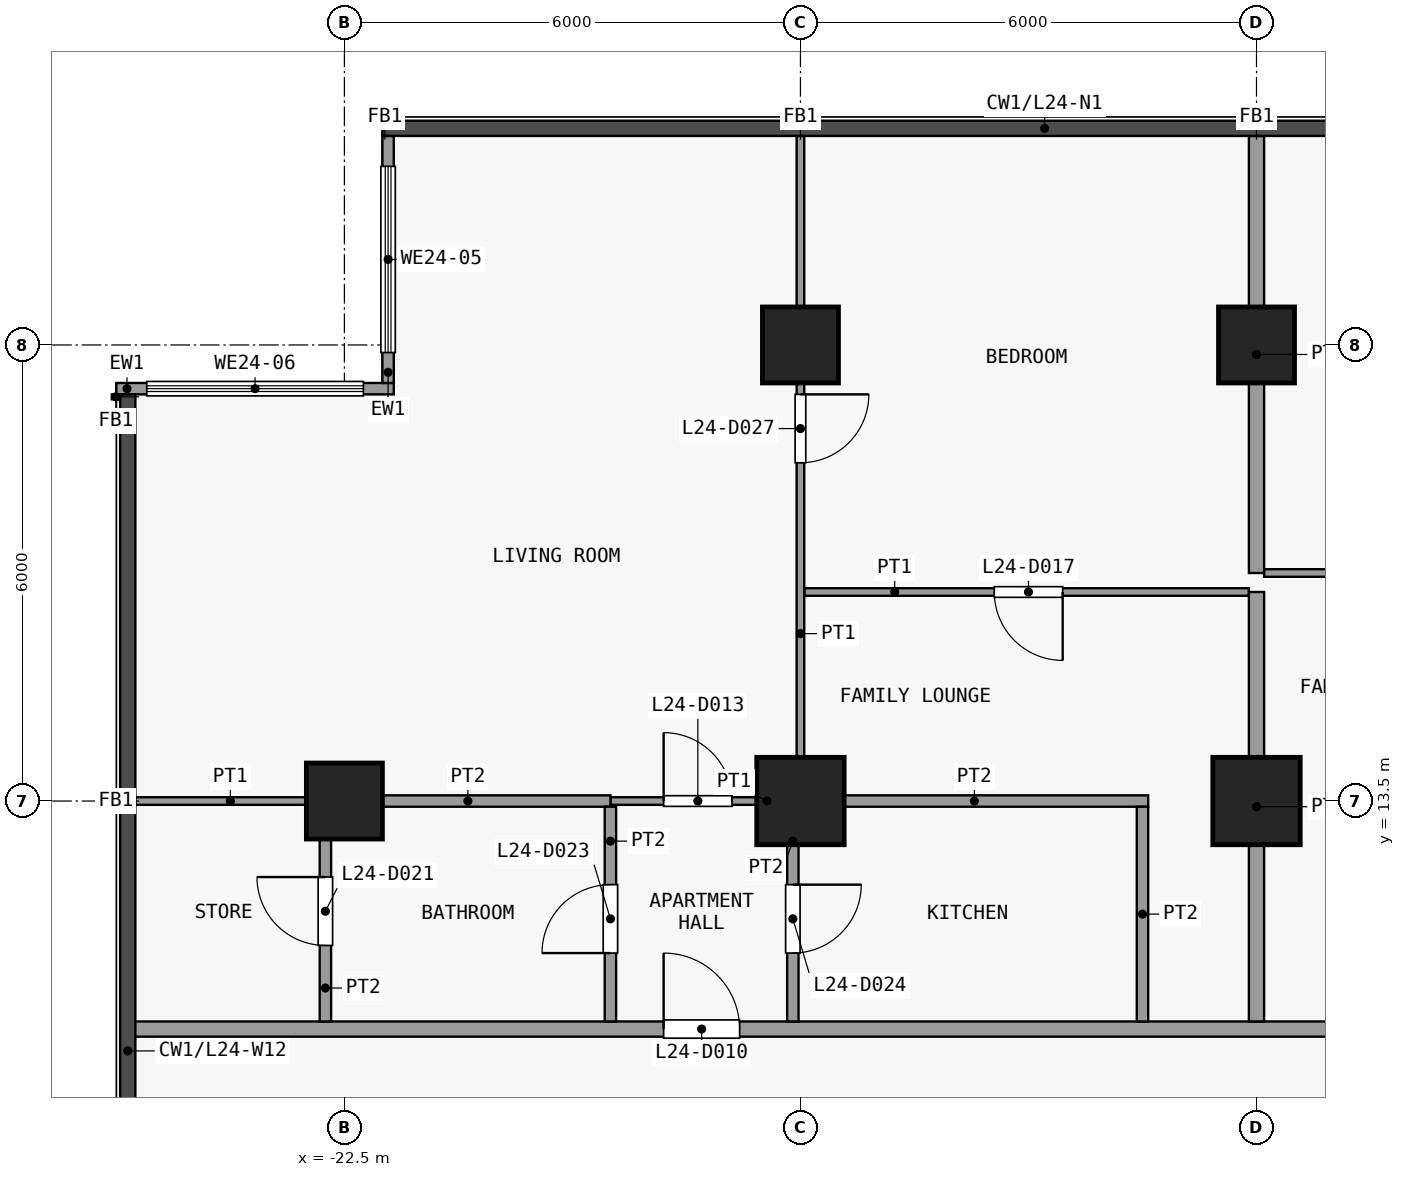
"""IFC4 building model, lengths in metres.
Left out: names, types, materials, properties, quantities, classifications, styles, units other than length and angle.
Written with IfcOpenShell. Run it as: python <this file> out.ifc"""

import sys

from ifc_helpers import new_model, si_unit, direction, frame, frame_2d, origin, origin_2d, place, context, subcontext, project, spatial, rectangle, extrude, element, fill, save


model = new_model("IFC4")
c1 = context("Model", 3, precision=1e-05, world=origin(), true_north=direction((0.0, 1.0)))
c2 = subcontext(c1, "Body", "Model", "MODEL_VIEW")
j1 = project(units=[si_unit("LENGTHUNIT", "METRE"), si_unit("PLANEANGLEUNIT", "RADIAN")], contexts=[c1])
p1 = place(None, origin())
s1 = spatial("IfcSite", under=j1, at=p1, CompositionType="ELEMENT")
p2 = place(p1, origin())
s2 = spatial("IfcBuilding", under=s1, at=p2, CompositionType="ELEMENT")
p3 = place(p2, frame((0.0, 0.0, 99.1)))
s3 = spatial("IfcBuildingStorey", under=s2, at=p3, CompositionType="ELEMENT", Elevation=99.1)
p4 = place(p3, frame((-22.5, 13.5, 0.0), z_axis=(0.0, 0.0, 1.0), x_axis=(1.0, 0.0, 0.0)))
e1 = element("IfcColumn", 1, at=p4, inside=s3, PredefinedType="COLUMN", context=c2, shape_type="SweptSolid", body=[
    extrude(rectangle(XDim=1.0, YDim=1.0, at=origin_2d()), origin(), (0.0, 0.0, 1.0), 3.6),
])
p5 = place(p3, frame((-16.5, 13.5, 0.0), z_axis=(0.0, 0.0, 1.0), x_axis=(1.0, 0.0, 0.0)))
e2 = element("IfcColumn", 2, at=p5, inside=s3, PredefinedType="COLUMN", context=c2, shape_type="SweptSolid", body=[
    extrude(rectangle(XDim=1.15, YDim=1.15, at=origin_2d()), origin(), (0.0, 0.0, 1.0), 3.6),
])
p6 = place(p3, frame((-16.5, 19.5, 0.0), z_axis=(0.0, 0.0, 1.0), x_axis=(1.0, 0.0, 0.0)))
e3 = element("IfcColumn", 3, at=p6, inside=s3, PredefinedType="COLUMN", context=c2, shape_type="SweptSolid", body=[
    extrude(rectangle(XDim=1.0, YDim=1.0, at=origin_2d()), origin(), (0.0, 0.0, 1.0), 3.6),
])
p7 = place(p3, frame((-10.5, 13.5, 0.0), z_axis=(0.0, 0.0, 1.0), x_axis=(1.0, 0.0, 0.0)))
e4 = element("IfcColumn", 4, at=p7, inside=s3, PredefinedType="COLUMN", context=c2, shape_type="SweptSolid", body=[
    extrude(rectangle(XDim=1.15, YDim=1.15, at=origin_2d()), origin(), (0.0, 0.0, 1.0), 3.6),
])
p8 = place(p3, frame((-10.5, 19.5, 0.0), z_axis=(0.0, 0.0, 1.0), x_axis=(1.0, 0.0, 0.0)))
e5 = element("IfcColumn", 5, at=p8, inside=s3, PredefinedType="COLUMN", context=c2, shape_type="SweptSolid", body=[
    extrude(rectangle(XDim=1.0, YDim=1.0, at=origin_2d()), origin(), (0.0, 0.0, 1.0), 3.6),
])
p9 = place(p3, frame((-21.925, 19.0, 0.0), z_axis=(0.0, 0.0, 1.0), x_axis=(0.0, 1.0, 0.0)))
e6 = element("IfcWall", 6, at=p9, inside=s3, PredefinedType="SOLIDWALL", context=c2, shape_type="SweptSolid", body=[
    extrude(rectangle(XDim=3.25, YDim=0.15, at=frame_2d((1.625, 0.0))), origin(), (0.0, 0.0, 1.0), 3.3),
])
p10 = place(p9, frame((0.4, 0.0, 0.9)))
e7 = element("IfcOpeningElement", 7, at=p10, cuts=e6, PredefinedType="OPENING", context=c2, shape_type="SweptSolid", body=[
    extrude(rectangle(XDim=2.45, YDim=2.4, at=frame_2d((1.225, 1.2))), frame((0.0, 0.085, 0.0), z_axis=(0.0, -1.0, 0.0), x_axis=(1.0, 0.0, 0.0)), (0.0, 0.0, 1.0), 0.17),
])
p11 = place(p3, frame((-25.5, 18.925, 0.0), z_axis=(0.0, 0.0, 1.0), x_axis=(1.0, 0.0, 0.0)))
e8 = element("IfcWall", 8, at=p11, inside=s3, PredefinedType="SOLIDWALL", context=c2, shape_type="SweptSolid", body=[
    extrude(rectangle(XDim=3.65, YDim=0.15, at=frame_2d((1.825, 0.0))), origin(), (0.0, 0.0, 1.0), 3.3),
])
p12 = place(p11, frame((0.4, 0.0, 0.9)))
e9 = element("IfcOpeningElement", 9, at=p12, cuts=e8, PredefinedType="OPENING", context=c2, shape_type="SweptSolid", body=[
    extrude(rectangle(XDim=2.85, YDim=2.4, at=frame_2d((1.425, 1.2))), frame((0.0, 0.085, 0.0), z_axis=(0.0, -1.0, 0.0), x_axis=(1.0, 0.0, 0.0)), (0.0, 0.0, 1.0), 0.17),
])
p13 = place(p3, frame((-25.35, 10.5, 0.0), z_axis=(0.0, 0.0, 1.0), x_axis=(1.0, 0.0, 0.0)))
e10 = element("IfcWall", 10, at=p13, inside=s3, PredefinedType="PARTITIONING", context=c2, shape_type="SweptSolid", body=[
    extrude(rectangle(XDim=49.2, YDim=0.2, at=frame_2d((24.6, 0.0))), origin(), (0.0, 0.0, 1.0), 3.3),
])
p14 = place(p13, frame((7.05, 0.0, 0.0)))
e11 = element("IfcOpeningElement", 11, at=p14, cuts=e10, PredefinedType="OPENING", context=c2, shape_type="SweptSolid", body=[
    extrude(rectangle(XDim=1.0, YDim=2.1, at=frame_2d((0.5, 1.05))), frame((0.0, 0.11, 0.0), z_axis=(0.0, -1.0, 0.0), x_axis=(1.0, 0.0, 0.0)), (0.0, 0.0, 1.0), 0.22),
])
p15 = place(p13, frame((21.55, 0.0, 0.0)))
e12 = element("IfcOpeningElement", 12, at=p15, cuts=e10, PredefinedType="OPENING", context=c2, shape_type="SweptSolid", body=[
    extrude(rectangle(XDim=1.0, YDim=2.1, at=frame_2d((0.5, 1.05))), frame((0.0, 0.11, 0.0), z_axis=(0.0, -1.0, 0.0), x_axis=(1.0, 0.0, 0.0)), (0.0, 0.0, 1.0), 0.22),
])
p16 = place(p13, frame((45.05, 0.0, 0.0)))
e13 = element("IfcOpeningElement", 13, at=p16, cuts=e10, PredefinedType="OPENING", context=c2, shape_type="SweptSolid", body=[
    extrude(rectangle(XDim=1.0, YDim=2.1, at=frame_2d((0.5, 1.05))), frame((0.0, 0.11, 0.0), z_axis=(0.0, -1.0, 0.0), x_axis=(1.0, 0.0, 0.0)), (0.0, 0.0, 1.0), 0.22),
])
p17 = place(p3, frame((-25.25, 13.5, 0.0), z_axis=(0.0, 0.0, 1.0), x_axis=(1.0, 0.0, 0.0)))
e14 = element("IfcWall", 14, at=p17, inside=s3, PredefinedType="PARTITIONING", context=c2, shape_type="SweptSolid", body=[
    extrude(rectangle(XDim=2.5, YDim=0.1, at=frame_2d((1.25, 0.0))), origin(), (0.0, 0.0, 1.0), 3.3),
])
p18 = place(p3, frame((-19.0, 13.5, 0.0), z_axis=(0.0, 0.0, 1.0), x_axis=(1.0, 0.0, 0.0)))
e15 = element("IfcWall", 15, at=p18, inside=s3, PredefinedType="PARTITIONING", context=c2, shape_type="SweptSolid", body=[
    extrude(rectangle(XDim=2.4, YDim=0.1, at=frame_2d((1.2, 0.0))), origin(), (0.0, 0.0, 1.0), 3.3),
])
p19 = place(p18, frame((0.7, 0.0, 0.0)))
e16 = element("IfcOpeningElement", 16, at=p19, cuts=e15, PredefinedType="OPENING", context=c2, shape_type="SweptSolid", body=[
    extrude(rectangle(XDim=0.9, YDim=2.1, at=frame_2d((0.45, 1.05))), frame((0.0, 0.06, 0.0), z_axis=(0.0, -1.0, 0.0), x_axis=(1.0, 0.0, 0.0)), (0.0, 0.0, 1.0), 0.12),
])
p20 = place(p3, frame((-22.75, 13.5, 0.0), z_axis=(0.0, 0.0, 1.0), x_axis=(1.0, 0.0, 0.0)))
e17 = element("IfcWall", 17, at=p20, inside=s3, PredefinedType="PARTITIONING", context=c2, shape_type="SweptSolid", body=[
    extrude(rectangle(XDim=3.75, YDim=0.15, at=frame_2d((1.875, 0.0))), origin(), (0.0, 0.0, 1.0), 3.3),
])
p21 = place(p3, frame((-16.5, 13.5, 0.0), z_axis=(0.0, 0.0, 1.0), x_axis=(1.0, 0.0, 0.0)))
e18 = element("IfcWall", 18, at=p21, inside=s3, PredefinedType="PARTITIONING", context=c2, shape_type="SweptSolid", body=[
    extrude(rectangle(XDim=4.575, YDim=0.15, at=frame_2d((2.288, 0.0))), origin(), (0.0, 0.0, 1.0), 3.3),
])
p22 = place(p3, frame((-16.45, 16.25, 0.0), z_axis=(0.0, 0.0, 1.0), x_axis=(1.0, 0.0, 0.0)))
e19 = element("IfcWall", 19, at=p22, inside=s3, PredefinedType="PARTITIONING", context=c2, shape_type="SweptSolid", body=[
    extrude(rectangle(XDim=5.85, YDim=0.1, at=frame_2d((2.925, 0.0))), origin(), (0.0, 0.0, 1.0), 3.3),
])
p23 = place(p22, frame((2.5, 0.0, 0.0)))
e20 = element("IfcOpeningElement", 20, at=p23, cuts=e19, PredefinedType="OPENING", context=c2, shape_type="SweptSolid", body=[
    extrude(rectangle(XDim=0.9, YDim=2.1, at=frame_2d((0.45, 1.05))), frame((0.0, 0.06, 0.0), z_axis=(0.0, -1.0, 0.0), x_axis=(1.0, 0.0, 0.0)), (0.0, 0.0, 1.0), 0.12),
])
p24 = place(p3, frame((-10.4, 16.5, 0.0), z_axis=(0.0, 0.0, 1.0), x_axis=(1.0, 0.0, 0.0)))
e21 = element("IfcWall", 21, at=p24, inside=s3, PredefinedType="PARTITIONING", context=c2, shape_type="SweptSolid", body=[
    extrude(rectangle(XDim=5.85, YDim=0.1, at=frame_2d((2.925, 0.0))), origin(), (0.0, 0.0, 1.0), 3.3),
])
p25 = place(p24, frame((2.5, 0.0, 0.0)))
e22 = element("IfcOpeningElement", 22, at=p25, cuts=e21, PredefinedType="OPENING", context=c2, shape_type="SweptSolid", body=[
    extrude(rectangle(XDim=0.9, YDim=2.1, at=frame_2d((0.45, 1.05))), frame((0.0, 0.06, 0.0), z_axis=(0.0, -1.0, 0.0), x_axis=(1.0, 0.0, 0.0)), (0.0, 0.0, 1.0), 0.12),
])
p26 = place(p3, frame((-22.75, 10.6, 0.0), z_axis=(0.0, 0.0, 1.0), x_axis=(0.0, 1.0, 0.0)))
e23 = element("IfcWall", 23, at=p26, inside=s3, PredefinedType="PARTITIONING", context=c2, shape_type="SweptSolid", body=[
    extrude(rectangle(XDim=2.825, YDim=0.15, at=frame_2d((1.413, 0.0))), origin(), (0.0, 0.0, 1.0), 3.3),
])
p27 = place(p26, frame((1.0, 0.0, 0.0)))
e24 = element("IfcOpeningElement", 24, at=p27, cuts=e23, PredefinedType="OPENING", context=c2, shape_type="SweptSolid", body=[
    extrude(rectangle(XDim=0.9, YDim=2.1, at=frame_2d((0.45, 1.05))), frame((0.0, 0.085, 0.0), z_axis=(0.0, -1.0, 0.0), x_axis=(1.0, 0.0, 0.0)), (0.0, 0.0, 1.0), 0.17),
])
p28 = place(p3, frame((-19.0, 10.6, 0.0), z_axis=(0.0, 0.0, 1.0), x_axis=(0.0, 1.0, 0.0)))
e25 = element("IfcWall", 25, at=p28, inside=s3, PredefinedType="PARTITIONING", context=c2, shape_type="SweptSolid", body=[
    extrude(rectangle(XDim=2.825, YDim=0.15, at=frame_2d((1.413, 0.0))), origin(), (0.0, 0.0, 1.0), 3.3),
])
p29 = place(p28, frame((0.9, 0.0, 0.0)))
e26 = element("IfcOpeningElement", 26, at=p29, cuts=e25, PredefinedType="OPENING", context=c2, shape_type="SweptSolid", body=[
    extrude(rectangle(XDim=0.9, YDim=2.1, at=frame_2d((0.45, 1.05))), frame((0.0, 0.085, 0.0), z_axis=(0.0, -1.0, 0.0), x_axis=(1.0, 0.0, 0.0)), (0.0, 0.0, 1.0), 0.17),
])
p30 = place(p3, frame((-16.6, 10.6, 0.0), z_axis=(0.0, 0.0, 1.0), x_axis=(0.0, 1.0, 0.0)))
e27 = element("IfcWall", 27, at=p30, inside=s3, PredefinedType="PARTITIONING", context=c2, shape_type="SweptSolid", body=[
    extrude(rectangle(XDim=2.825, YDim=0.15, at=frame_2d((1.413, 0.0))), origin(), (0.0, 0.0, 1.0), 3.3),
])
p31 = place(p30, frame((0.9, 0.0, 0.0)))
e28 = element("IfcOpeningElement", 28, at=p31, cuts=e27, PredefinedType="OPENING", context=c2, shape_type="SweptSolid", body=[
    extrude(rectangle(XDim=0.9, YDim=2.1, at=frame_2d((0.45, 1.05))), frame((0.0, 0.085, 0.0), z_axis=(0.0, -1.0, 0.0), x_axis=(1.0, 0.0, 0.0)), (0.0, 0.0, 1.0), 0.17),
])
p32 = place(p3, frame((-16.5, 13.575, 0.0), z_axis=(0.0, 0.0, 1.0), x_axis=(0.0, 1.0, 0.0)))
e29 = element("IfcWall", 29, at=p32, inside=s3, PredefinedType="PARTITIONING", context=c2, shape_type="SweptSolid", body=[
    extrude(rectangle(XDim=8.675, YDim=0.1, at=frame_2d((4.337, 0.0))), origin(), (0.0, 0.0, 1.0), 3.3),
])
p33 = place(p32, frame((4.375, 0.0, 0.0)))
e30 = element("IfcOpeningElement", 30, at=p33, cuts=e29, PredefinedType="OPENING", context=c2, shape_type="SweptSolid", body=[
    extrude(rectangle(XDim=0.9, YDim=2.1, at=frame_2d((0.45, 1.05))), frame((0.0, 0.06, 0.0), z_axis=(0.0, -1.0, 0.0), x_axis=(1.0, 0.0, 0.0)), (0.0, 0.0, 1.0), 0.12),
])
p34 = place(p3, frame((-12.0, 10.6, 0.0), z_axis=(0.0, 0.0, 1.0), x_axis=(0.0, 1.0, 0.0)))
e31 = element("IfcWall", 31, at=p34, inside=s3, PredefinedType="PARTITIONING", context=c2, shape_type="SweptSolid", body=[
    extrude(rectangle(XDim=2.825, YDim=0.15, at=frame_2d((1.413, 0.0))), origin(), (0.0, 0.0, 1.0), 3.3),
])
p35 = place(p3, frame((-10.5, 10.6, 0.0), z_axis=(0.0, 0.0, 1.0), x_axis=(0.0, 1.0, 0.0)))
e32 = element("IfcWall", 32, at=p35, inside=s3, PredefinedType="PARTITIONING", context=c2, shape_type="SweptSolid", body=[
    extrude(rectangle(XDim=5.65, YDim=0.2, at=frame_2d((2.825, 0.0))), origin(), (0.0, 0.0, 1.0), 3.3),
])
p36 = place(p3, frame((-10.5, 16.5, 0.0), z_axis=(0.0, 0.0, 1.0), x_axis=(0.0, 1.0, 0.0)))
e33 = element("IfcWall", 33, at=p36, inside=s3, PredefinedType="PARTITIONING", context=c2, shape_type="SweptSolid", body=[
    extrude(rectangle(XDim=5.75, YDim=0.2, at=frame_2d((2.875, 0.0))), origin(), (0.0, 0.0, 1.0), 3.3),
])
p37 = place(p10, origin())
e34 = element("IfcWindow", 34, at=p37, inside=s3, PartitioningType="SINGLE_PANEL", PredefinedType="WINDOW", context=c2, shape_type="SweptSolid", body=[
    extrude(rectangle(XDim=2.45, YDim=2.4, at=frame_2d((1.225, 1.2))), frame((0.0, 0.03, 0.0), z_axis=(0.0, -1.0, 0.0), x_axis=(1.0, 0.0, 0.0)), (0.0, 0.0, 1.0), 0.06),
])
fill(e7, e34)
p38 = place(p12, origin())
e35 = element("IfcWindow", 35, at=p38, inside=s3, PartitioningType="SINGLE_PANEL", PredefinedType="WINDOW", context=c2, shape_type="SweptSolid", body=[
    extrude(rectangle(XDim=2.85, YDim=2.4, at=frame_2d((1.425, 1.2))), frame((0.0, 0.03, 0.0), z_axis=(0.0, -1.0, 0.0), x_axis=(1.0, 0.0, 0.0)), (0.0, 0.0, 1.0), 0.06),
])
fill(e9, e35)
p39 = place(p14, origin())
e36 = element("IfcDoor", 36, at=p39, inside=s3, OperationType="SINGLE_SWING_RIGHT", PredefinedType="DOOR", context=c2, shape_type="SweptSolid", body=[
    extrude(rectangle(XDim=1.0, YDim=2.1, at=frame_2d((0.5, 1.05))), frame((0.0, 0.025, 0.0), z_axis=(0.0, -1.0, 0.0), x_axis=(1.0, 0.0, 0.0)), (0.0, 0.0, 1.0), 0.05),
])
fill(e11, e36)
p40 = place(p19, origin())
e37 = element("IfcDoor", 37, at=p40, inside=s3, OperationType="SINGLE_SWING_RIGHT", PredefinedType="DOOR", context=c2, shape_type="SweptSolid", body=[
    extrude(rectangle(XDim=0.9, YDim=2.1, at=frame_2d((0.45, 1.05))), frame((0.0, 0.025, 0.0), z_axis=(0.0, -1.0, 0.0), x_axis=(1.0, 0.0, 0.0)), (0.0, 0.0, 1.0), 0.05),
])
fill(e16, e37)
p41 = place(p23, origin())
e38 = element("IfcDoor", 38, at=p41, inside=s3, OperationType="SINGLE_SWING_RIGHT", PredefinedType="DOOR", context=c2, shape_type="SweptSolid", body=[
    extrude(rectangle(XDim=0.9, YDim=2.1, at=frame_2d((0.45, 1.05))), frame((0.0, 0.025, 0.0), z_axis=(0.0, -1.0, 0.0), x_axis=(1.0, 0.0, 0.0)), (0.0, 0.0, 1.0), 0.05),
])
fill(e20, e38)
p42 = place(p27, origin())
e39 = element("IfcDoor", 39, at=p42, inside=s3, OperationType="SINGLE_SWING_LEFT", PredefinedType="DOOR", context=c2, shape_type="SweptSolid", body=[
    extrude(rectangle(XDim=0.9, YDim=2.1, at=frame_2d((0.45, 1.05))), frame((0.0, 0.025, 0.0), z_axis=(0.0, -1.0, 0.0), x_axis=(1.0, 0.0, 0.0)), (0.0, 0.0, 1.0), 0.05),
])
fill(e24, e39)
p43 = place(p29, origin())
e40 = element("IfcDoor", 40, at=p43, inside=s3, OperationType="SINGLE_SWING_RIGHT", PredefinedType="DOOR", context=c2, shape_type="SweptSolid", body=[
    extrude(rectangle(XDim=0.9, YDim=2.1, at=frame_2d((0.45, 1.05))), frame((0.0, 0.025, 0.0), z_axis=(0.0, -1.0, 0.0), x_axis=(1.0, 0.0, 0.0)), (0.0, 0.0, 1.0), 0.05),
])
fill(e26, e40)
p44 = place(p31, origin())
e41 = element("IfcDoor", 41, at=p44, inside=s3, OperationType="SINGLE_SWING_RIGHT", PredefinedType="DOOR", context=c2, shape_type="SweptSolid", body=[
    extrude(rectangle(XDim=0.9, YDim=2.1, at=frame_2d((0.45, 1.05))), frame((0.0, 0.025, 0.0), z_axis=(0.0, -1.0, 0.0), x_axis=(1.0, 0.0, 0.0)), (0.0, 0.0, 1.0), 0.05),
])
fill(e28, e41)
p45 = place(p33, origin())
e42 = element("IfcDoor", 42, at=p45, inside=s3, OperationType="SINGLE_SWING_RIGHT", PredefinedType="DOOR", context=c2, shape_type="SweptSolid", body=[
    extrude(rectangle(XDim=0.9, YDim=2.1, at=frame_2d((0.45, 1.05))), frame((0.0, 0.025, 0.0), z_axis=(0.0, -1.0, 0.0), x_axis=(1.0, 0.0, 0.0)), (0.0, 0.0, 1.0), 0.05),
])
fill(e30, e42)
save(model, sys.argv[1])
